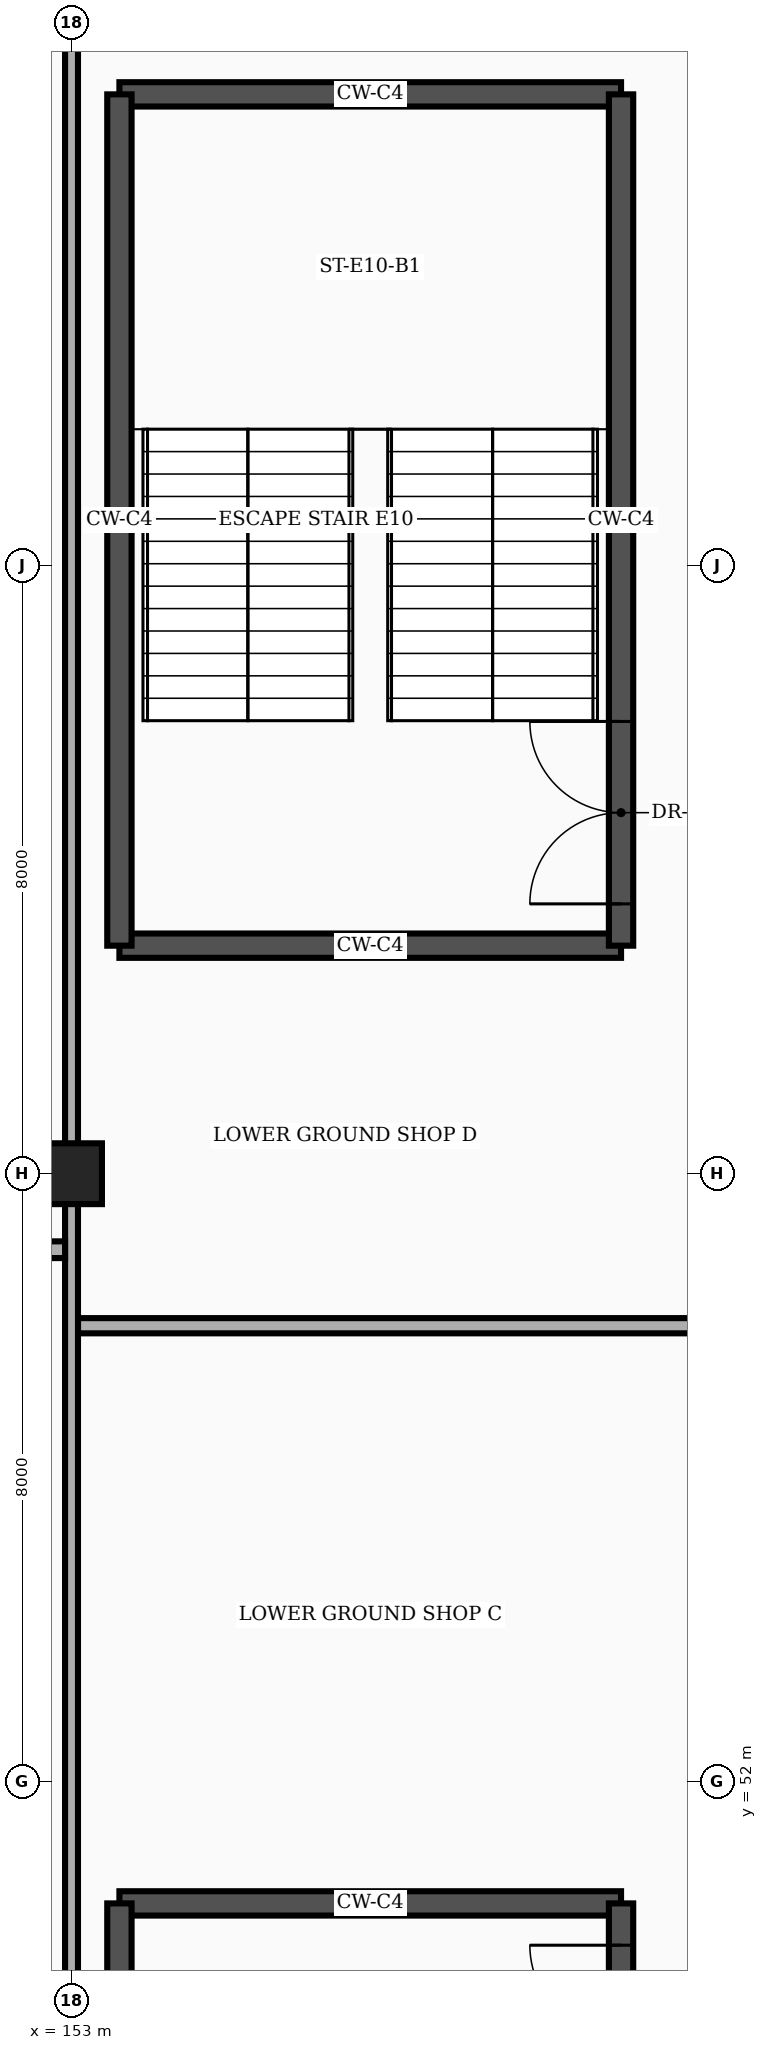
"""IFC4 building model, lengths in metres.
Left out: names, types, materials, properties, quantities, classifications, styles, units other than length and angle.
Written with IfcOpenShell. Run it as: python <this file> out.ifc"""

import sys

from ifc_helpers import new_model, si_unit, direction, frame, frame_2d, origin, origin_2d, place, context, subcontext, project, spatial, rectangle, extrude, element, fill, save


model = new_model("IFC4")
c1 = context("Model", 3, precision=1e-05, world=origin(), true_north=direction((0.0, 1.0)))
c2 = subcontext(c1, "Body", "Model", "MODEL_VIEW")
j1 = project(units=[si_unit("LENGTHUNIT", "METRE"), si_unit("PLANEANGLEUNIT", "RADIAN")], contexts=[c1])
p1 = place(None, origin())
s1 = spatial("IfcSite", under=j1, at=p1, CompositionType="ELEMENT")
p2 = place(p1, origin())
s2 = spatial("IfcBuilding", under=s1, at=p2, CompositionType="ELEMENT")
p3 = place(p2, frame((0.0, 0.0, -4.5)))
s3 = spatial("IfcBuildingStorey", under=s2, at=p3, CompositionType="ELEMENT", Elevation=-4.5)
p4 = place(p3, frame((153.0, 60.0, -0.45), z_axis=(0.0, 0.0, 1.0), x_axis=(1.0, 0.0, 0.0)))
e1 = element("IfcColumn", 1, at=p4, inside=s3, PredefinedType="COLUMN", context=c2, shape_type="SweptSolid", body=[
    extrude(rectangle(XDim=0.8, YDim=0.8, at=origin_2d()), origin(), (0.0, 0.0, 1.0), 4.95),
])
p5 = place(p3, frame((153.63, 50.4, 0.0), z_axis=(0.0, 0.0, 1.0), x_axis=(1.0, 0.0, 0.0)))
e2 = element("IfcWall", 2, at=p5, inside=s3, PredefinedType="SHEAR", context=c2, shape_type="SweptSolid", body=[
    extrude(rectangle(XDim=6.6, YDim=0.32, at=frame_2d((3.3, 0.0))), origin(), (0.0, 0.0, 1.0), 4.24),
])
p6 = place(p3, frame((153.63, 39.2, 0.0), z_axis=(0.0, 0.0, 1.0), x_axis=(0.0, 1.0, 0.0)))
e3 = element("IfcWall", 3, at=p6, inside=s3, PredefinedType="SHEAR", context=c2, shape_type="SweptSolid", body=[
    extrude(rectangle(XDim=11.2, YDim=0.32, at=frame_2d((5.6, 0.0))), origin(), (0.0, 0.0, 1.0), 4.24),
])
p7 = place(p3, frame((160.23, 39.2, 0.0), z_axis=(0.0, 0.0, 1.0), x_axis=(0.0, 1.0, 0.0)))
e4 = element("IfcWall", 4, at=p7, inside=s3, PredefinedType="SHEAR", context=c2, shape_type="SweptSolid", body=[
    extrude(rectangle(XDim=11.2, YDim=0.32, at=frame_2d((5.6, 0.0))), origin(), (0.0, 0.0, 1.0), 4.24),
])
p8 = place(p7, frame((8.25, 0.0, 0.0)))
e5 = element("IfcOpeningElement", 5, at=p8, cuts=e4, PredefinedType="OPENING", context=c2, shape_type="SweptSolid", body=[
    extrude(rectangle(XDim=2.4, YDim=2.25, at=frame_2d((1.2, 1.125))), frame((0.0, 0.172, 0.0), z_axis=(0.0, -1.0, 0.0), x_axis=(1.0, 0.0, 0.0)), (0.0, 0.0, 1.0), 0.344),
])
for number, where, z_axis, x_axis in (
    (6, (153.63, 63.0, 0.0), (0.0, 0.0, 1.0), (1.0, 0.0, 0.0)),
    (7, (153.63, 74.2, 0.0), (0.0, 0.0, 1.0), (1.0, 0.0, 0.0)),
):
    element("IfcWall", number, at=place(p3, frame(where, z_axis=z_axis, x_axis=x_axis)), inside=s3, PredefinedType="SHEAR", context=c2, shape_type="SweptSolid", body=[
        extrude(rectangle(XDim=6.6, YDim=0.32, at=frame_2d((3.3, 0.0))), origin(), (0.0, 0.0, 1.0), 4.24),
    ])
p9 = place(p3, frame((153.63, 63.0, 0.0), z_axis=(0.0, 0.0, 1.0), x_axis=(0.0, 1.0, 0.0)))
e8 = element("IfcWall", 8, at=p9, inside=s3, PredefinedType="SHEAR", context=c2, shape_type="SweptSolid", body=[
    extrude(rectangle(XDim=11.2, YDim=0.32, at=frame_2d((5.6, 0.0))), origin(), (0.0, 0.0, 1.0), 4.24),
])
p10 = place(p3, frame((160.23, 63.0, 0.0), z_axis=(0.0, 0.0, 1.0), x_axis=(0.0, 1.0, 0.0)))
e9 = element("IfcWall", 9, at=p10, inside=s3, PredefinedType="SHEAR", context=c2, shape_type="SweptSolid", body=[
    extrude(rectangle(XDim=11.2, YDim=0.32, at=frame_2d((5.6, 0.0))), origin(), (0.0, 0.0, 1.0), 4.24),
])
p11 = place(p10, frame((0.55, 0.0, 0.0)))
e10 = element("IfcOpeningElement", 10, at=p11, cuts=e9, PredefinedType="OPENING", context=c2, shape_type="SweptSolid", body=[
    extrude(rectangle(XDim=2.4, YDim=2.25, at=frame_2d((1.2, 1.125))), frame((0.0, 0.172, 0.0), z_axis=(0.0, -1.0, 0.0), x_axis=(1.0, 0.0, 0.0)), (0.0, 0.0, 1.0), 0.344),
])
p12 = place(p3, frame((153.085, 58.0, 0.0), z_axis=(0.0, 0.0, 1.0), x_axis=(1.0, 0.0, 0.0)))
e11 = element("IfcWall", 11, at=p12, inside=s3, PredefinedType="PARTITIONING", context=c2, shape_type="SweptSolid", body=[
    extrude(rectangle(XDim=18.355, YDim=0.2, at=frame_2d((9.177, 0.0))), origin(), (0.0, 0.0, 1.0), 4.24),
])
for number, where, z_axis, x_axis in (
    (12, (153.0, 36.22, 0.0), (0.0, 0.0, 1.0), (0.0, 1.0, 0.0)),
    (13, (153.0, 60.22, 0.0), (0.0, 0.0, 1.0), (0.0, 1.0, 0.0)),
):
    element("IfcWall", number, at=place(p3, frame(where, z_axis=z_axis, x_axis=x_axis)), inside=s3, PredefinedType="PARTITIONING", context=c2, shape_type="SweptSolid", body=[
        extrude(rectangle(XDim=23.56, YDim=0.17, at=frame_2d((11.78, 0.0))), origin(), (0.0, 0.0, 1.0), 3.556),
    ])
p13 = place(p3, frame((126.11, 59.0, 0.0), z_axis=(0.0, 0.0, 1.0), x_axis=(1.0, 0.0, 0.0)))
e14 = element("IfcWall", 14, at=p13, inside=s3, PredefinedType="PARTITIONING", context=c2, shape_type="SweptSolid", body=[
    extrude(rectangle(XDim=26.805, YDim=0.22, at=frame_2d((13.402, 0.0))), origin(), (0.0, 0.0, 1.0), 4.24),
])
p14 = place(p8, origin())
e15 = element("IfcDoor", 15, at=p14, inside=s3, OperationType="DOUBLE_DOOR_SINGLE_SWING", PredefinedType="DOOR", context=c2, shape_type="SweptSolid", body=[
    extrude(rectangle(XDim=2.4, YDim=2.25, at=frame_2d((1.2, 1.125))), frame((0.0, 0.025, 0.0), z_axis=(0.0, -1.0, 0.0), x_axis=(1.0, 0.0, 0.0)), (0.0, 0.0, 1.0), 0.05),
])
fill(e5, e15)
p15 = place(p11, origin())
e16 = element("IfcDoor", 16, at=p15, inside=s3, OperationType="DOUBLE_DOOR_SINGLE_SWING", PredefinedType="DOOR", context=c2, shape_type="SweptSolid", body=[
    extrude(rectangle(XDim=2.4, YDim=2.25, at=frame_2d((1.2, 1.125))), frame((0.0, 0.025, 0.0), z_axis=(0.0, -1.0, 0.0), x_axis=(1.0, 0.0, 0.0)), (0.0, 0.0, 1.0), 0.05),
])
fill(e10, e16)
save(model, sys.argv[1])
